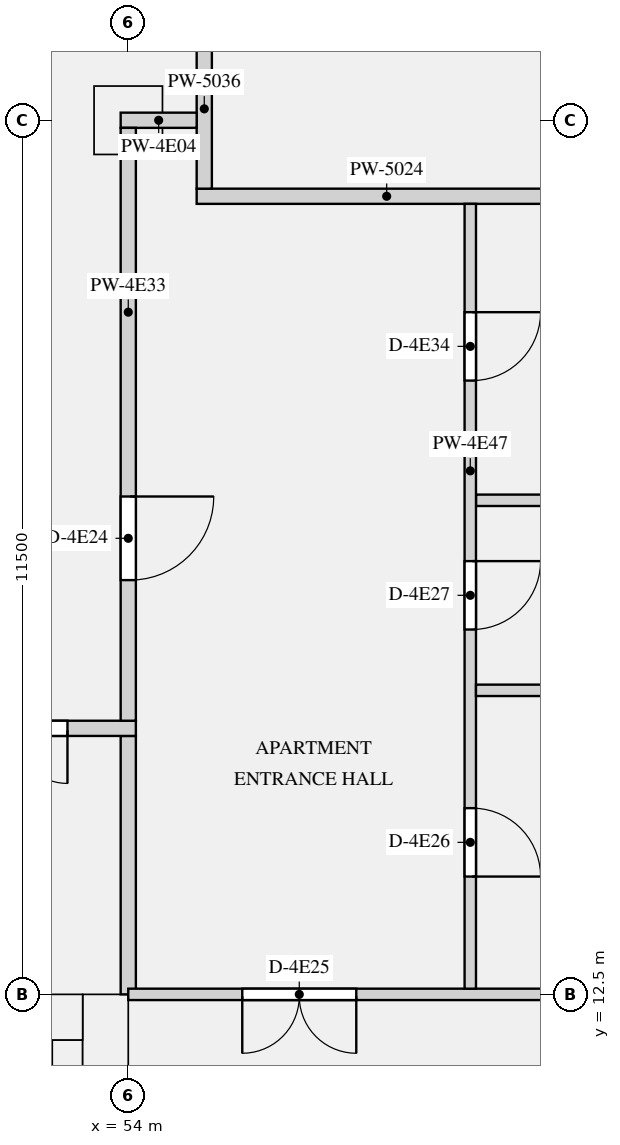
"""IFC4 building model, lengths in metres.
Left out: names, types, materials, properties, quantities, classifications, styles, units other than length and angle.
Written with IfcOpenShell. Run it as: python <this file> out.ifc"""

import sys

from ifc_helpers import new_model, si_unit, direction, frame, frame_2d, origin, origin_2d, place, context, subcontext, project, spatial, rectangle, extrude, element, fill, save


model = new_model("IFC4")
c1 = context("Model", 3, precision=1e-05, world=origin(), true_north=direction((0.0, 1.0)))
c2 = subcontext(c1, "Body", "Model", "MODEL_VIEW")
j1 = project(units=[si_unit("LENGTHUNIT", "METRE"), si_unit("PLANEANGLEUNIT", "RADIAN")], contexts=[c1])
p1 = place(None, origin())
s1 = spatial("IfcSite", under=j1, at=p1, CompositionType="ELEMENT")
p2 = place(p1, origin())
s2 = spatial("IfcBuilding", under=s1, at=p2, CompositionType="ELEMENT")
p3 = place(p2, frame((0.0, 0.0, 232.65)))
s3 = spatial("IfcBuildingStorey", under=s2, at=p3, CompositionType="ELEMENT", Elevation=232.65)
p4 = place(p3, frame((54.0, 24.0, 0.0), z_axis=(0.0, 0.0, 1.0), x_axis=(1.0, 0.0, 0.0)))
e1 = element("IfcColumn", 1, at=p4, inside=s3, PredefinedType="COLUMN", context=c2, shape_type="SweptSolid", body=[
    extrude(rectangle(XDim=0.9, YDim=0.9, at=origin_2d()), origin(), (0.0, 0.0, 1.0), 3.15),
])
p5 = place(p3, frame((53.7, 0.0, 0.0), z_axis=(0.0, 0.0, 1.0), x_axis=(0.0, 1.0, 0.0)))
e2 = element("IfcWall", 2, at=p5, inside=s3, PredefinedType="SHEAR", context=c2, shape_type="SweptSolid", body=[
    extrude(rectangle(XDim=12.5, YDim=0.6, at=frame_2d((6.25, 0.0))), origin(), (0.0, 0.0, 1.0), 3.15),
])
p6 = place(p3, frame((18.6, 12.2, 0.0), z_axis=(0.0, 0.0, 1.0), x_axis=(1.0, 0.0, 0.0)))
e3 = element("IfcWall", 3, at=p6, inside=s3, PredefinedType="SHEAR", context=c2, shape_type="SweptSolid", body=[
    extrude(rectangle(XDim=34.8, YDim=0.6, at=frame_2d((17.4, 0.0))), origin(), (0.0, 0.0, 1.0), 3.15),
])
p7 = place(p6, frame((24.575, 0.0, 0.0)))
e4 = element("IfcOpeningElement", 4, at=p7, cuts=e3, PredefinedType="OPENING", context=c2, shape_type="SweptSolid", body=[
    extrude(rectangle(XDim=1.1, YDim=2.1, at=frame_2d((0.55, 1.05))), frame((0.0, 0.31, 0.0), z_axis=(0.0, -1.0, 0.0), x_axis=(1.0, 0.0, 0.0)), (0.0, 0.0, 1.0), 0.62),
])
p8 = place(p6, frame((26.825, 0.0, 0.0)))
e5 = element("IfcOpeningElement", 5, at=p8, cuts=e3, PredefinedType="OPENING", context=c2, shape_type="SweptSolid", body=[
    extrude(rectangle(XDim=1.1, YDim=2.1, at=frame_2d((0.55, 1.05))), frame((0.0, 0.31, 0.0), z_axis=(0.0, -1.0, 0.0), x_axis=(1.0, 0.0, 0.0)), (0.0, 0.0, 1.0), 0.62),
])
p9 = place(p6, frame((29.075, 0.0, 0.0)))
e6 = element("IfcOpeningElement", 6, at=p9, cuts=e3, PredefinedType="OPENING", context=c2, shape_type="SweptSolid", body=[
    extrude(rectangle(XDim=1.1, YDim=2.1, at=frame_2d((0.55, 1.05))), frame((0.0, 0.31, 0.0), z_axis=(0.0, -1.0, 0.0), x_axis=(1.0, 0.0, 0.0)), (0.0, 0.0, 1.0), 0.62),
])
p10 = place(p6, frame((4.95, 0.0, 0.0)))
e7 = element("IfcOpeningElement", 7, at=p10, cuts=e3, PredefinedType="OPENING", context=c2, shape_type="SweptSolid", body=[
    extrude(rectangle(XDim=0.9, YDim=2.1, at=frame_2d((0.45, 1.05))), frame((0.0, 0.31, 0.0), z_axis=(0.0, -1.0, 0.0), x_axis=(1.0, 0.0, 0.0)), (0.0, 0.0, 1.0), 0.62),
])
p11 = place(p6, frame((11.95, 0.0, 0.0)))
e8 = element("IfcOpeningElement", 8, at=p11, cuts=e3, PredefinedType="OPENING", context=c2, shape_type="SweptSolid", body=[
    extrude(rectangle(XDim=0.9, YDim=2.1, at=frame_2d((0.45, 1.05))), frame((0.0, 0.31, 0.0), z_axis=(0.0, -1.0, 0.0), x_axis=(1.0, 0.0, 0.0)), (0.0, 0.0, 1.0), 0.62),
])
p12 = place(p6, frame((18.45, 0.0, 0.0)))
e9 = element("IfcOpeningElement", 9, at=p12, cuts=e3, PredefinedType="OPENING", context=c2, shape_type="SweptSolid", body=[
    extrude(rectangle(XDim=0.9, YDim=2.1, at=frame_2d((0.45, 1.05))), frame((0.0, 0.31, 0.0), z_axis=(0.0, -1.0, 0.0), x_axis=(1.0, 0.0, 0.0)), (0.0, 0.0, 1.0), 0.62),
])
p13 = place(p6, frame((1.55, 0.0, 0.0)))
e10 = element("IfcOpeningElement", 10, at=p13, cuts=e3, PredefinedType="OPENING", context=c2, shape_type="SweptSolid", body=[
    extrude(rectangle(XDim=1.2, YDim=2.1, at=frame_2d((0.6, 1.05))), frame((0.0, 0.31, 0.0), z_axis=(0.0, -1.0, 0.0), x_axis=(1.0, 0.0, 0.0)), (0.0, 0.0, 1.0), 0.62),
])
p14 = place(p6, frame((32.05, 0.0, 0.0)))
e11 = element("IfcOpeningElement", 11, at=p14, cuts=e3, PredefinedType="OPENING", context=c2, shape_type="SweptSolid", body=[
    extrude(rectangle(XDim=1.2, YDim=2.1, at=frame_2d((0.6, 1.05))), frame((0.0, 0.31, 0.0), z_axis=(0.0, -1.0, 0.0), x_axis=(1.0, 0.0, 0.0)), (0.0, 0.0, 1.0), 0.62),
])
p15 = place(p3, frame((53.2, 1.0, 0.0), z_axis=(0.0, 0.0, 1.0), x_axis=(0.0, 1.0, 0.0)))
e12 = element("IfcWall", 12, at=p15, inside=s3, PredefinedType="SHEAR", context=c2, shape_type="SweptSolid", body=[
    extrude(rectangle(XDim=10.9, YDim=0.4, at=frame_2d((5.45, 0.0))), origin(), (0.0, 0.0, 1.0), 3.15),
])
p16 = place(p3, frame((54.9, 23.0, 0.0), z_axis=(0.0, 0.0, 1.0), x_axis=(1.0, 0.0, 0.0)))
e13 = element("IfcWall", 13, at=p16, inside=s3, PredefinedType="PARTITIONING", context=c2, shape_type="SweptSolid", body=[
    extrude(rectangle(XDim=5.0, YDim=0.2, at=frame_2d((2.5, 0.0))), origin(), (0.0, 0.0, 1.0), 2.8),
])
p17 = place(p3, frame((54.0, 12.5, 0.0), z_axis=(0.0, 0.0, 1.0), x_axis=(0.0, 1.0, 0.0)))
e14 = element("IfcWall", 14, at=p17, inside=s3, PredefinedType="PARTITIONING", context=c2, shape_type="SweptSolid", body=[
    extrude(rectangle(XDim=3.4, YDim=0.2, at=frame_2d((1.7, 0.0))), origin(), (0.0, 0.0, 1.0), 2.8),
])
p18 = place(p3, frame((55.0, 23.1, 0.0), z_axis=(0.0, 0.0, 1.0), x_axis=(0.0, 1.0, 0.0)))
e15 = element("IfcWall", 15, at=p18, inside=s3, PredefinedType="PARTITIONING", context=c2, shape_type="SweptSolid", body=[
    extrude(rectangle(XDim=3.8, YDim=0.2, at=frame_2d((1.9, 0.0))), origin(), (0.0, 0.0, 1.0), 2.8),
])
p19 = place(p18, frame((2.1, 0.0, 0.0)))
e16 = element("IfcOpeningElement", 16, at=p19, cuts=e15, PredefinedType="OPENING", context=c2, shape_type="SweptSolid", body=[
    extrude(rectangle(XDim=1.2, YDim=2.1, at=frame_2d((0.6, 1.05))), frame((0.0, 0.11, 0.0), z_axis=(0.0, -1.0, 0.0), x_axis=(1.0, 0.0, 0.0)), (0.0, 0.0, 1.0), 0.22),
])
p20 = place(p3, frame((53.9, 24.0, 0.0), z_axis=(0.0, 0.0, 1.0), x_axis=(1.0, 0.0, 0.0)))
e17 = element("IfcWall", 17, at=p20, inside=s3, PredefinedType="PARTITIONING", context=c2, shape_type="SweptSolid", body=[
    extrude(rectangle(XDim=1.0, YDim=0.2, at=frame_2d((0.5, 0.0))), origin(), (0.0, 0.0, 1.0), 2.8),
])
p21 = place(p3, frame((58.575, 16.5, 0.0), z_axis=(0.0, 0.0, 1.0), x_axis=(1.0, 0.0, 0.0)))
e18 = element("IfcWall", 18, at=p21, inside=s3, PredefinedType="PARTITIONING", context=c2, shape_type="SweptSolid", body=[
    extrude(rectangle(XDim=4.35, YDim=0.15, at=frame_2d((2.175, 0.0))), origin(), (0.0, 0.0, 1.0), 2.8),
])
p22 = place(p3, frame((54.0, 12.5, 0.0), z_axis=(0.0, 0.0, 1.0), x_axis=(1.0, 0.0, 0.0)))
e19 = element("IfcWall", 19, at=p22, inside=s3, PredefinedType="PARTITIONING", context=c2, shape_type="SweptSolid", body=[
    extrude(rectangle(XDim=17.35, YDim=0.15, at=frame_2d((8.675, 0.0))), origin(), (0.0, 0.0, 1.0), 2.8),
])
p23 = place(p22, frame((1.5, 0.0, 0.0)))
e20 = element("IfcOpeningElement", 20, at=p23, cuts=e19, PredefinedType="OPENING", context=c2, shape_type="SweptSolid", body=[
    extrude(rectangle(XDim=1.5, YDim=2.1, at=frame_2d((0.75, 1.05))), frame((0.0, 0.085, 0.0), z_axis=(0.0, -1.0, 0.0), x_axis=(1.0, 0.0, 0.0)), (0.0, 0.0, 1.0), 0.17),
])
p24 = place(p22, frame((12.725, 0.0, 0.0)))
e21 = element("IfcOpeningElement", 21, at=p24, cuts=e19, PredefinedType="OPENING", context=c2, shape_type="SweptSolid", body=[
    extrude(rectangle(XDim=1.5, YDim=2.1, at=frame_2d((0.75, 1.05))), frame((0.0, 0.085, 0.0), z_axis=(0.0, -1.0, 0.0), x_axis=(1.0, 0.0, 0.0)), (0.0, 0.0, 1.0), 0.17),
])
p25 = place(p3, frame((58.575, 19.0, 0.0), z_axis=(0.0, 0.0, 1.0), x_axis=(1.0, 0.0, 0.0)))
e22 = element("IfcWall", 22, at=p25, inside=s3, PredefinedType="PARTITIONING", context=c2, shape_type="SweptSolid", body=[
    extrude(rectangle(XDim=4.35, YDim=0.15, at=frame_2d((2.175, 0.0))), origin(), (0.0, 0.0, 1.0), 2.8),
])
p26 = place(p3, frame((17.9, 16.0, 0.0), z_axis=(0.0, 0.0, 1.0), x_axis=(1.0, 0.0, 0.0)))
e23 = element("IfcWall", 23, at=p26, inside=s3, PredefinedType="PARTITIONING", context=c2, shape_type="SweptSolid", body=[
    extrude(rectangle(XDim=36.2, YDim=0.2, at=frame_2d((18.1, 0.0))), origin(), (0.0, 0.0, 1.0), 2.8),
])
p27 = place(p26, frame((0.9, 0.0, 0.0)))
e24 = element("IfcOpeningElement", 24, at=p27, cuts=e23, PredefinedType="OPENING", context=c2, shape_type="SweptSolid", body=[
    extrude(rectangle(XDim=1.4, YDim=2.1, at=frame_2d((0.7, 1.05))), frame((0.0, 0.11, 0.0), z_axis=(0.0, -1.0, 0.0), x_axis=(1.0, 0.0, 0.0)), (0.0, 0.0, 1.0), 0.22),
])
p28 = place(p26, frame((33.9, 0.0, 0.0)))
e25 = element("IfcOpeningElement", 25, at=p28, cuts=e23, PredefinedType="OPENING", context=c2, shape_type="SweptSolid", body=[
    extrude(rectangle(XDim=1.4, YDim=2.1, at=frame_2d((0.7, 1.05))), frame((0.0, 0.11, 0.0), z_axis=(0.0, -1.0, 0.0), x_axis=(1.0, 0.0, 0.0)), (0.0, 0.0, 1.0), 0.22),
])
p29 = place(p3, frame((54.0, 16.1, 0.0), z_axis=(0.0, 0.0, 1.0), x_axis=(0.0, 1.0, 0.0)))
e26 = element("IfcWall", 26, at=p29, inside=s3, PredefinedType="PARTITIONING", context=c2, shape_type="SweptSolid", body=[
    extrude(rectangle(XDim=7.8, YDim=0.2, at=frame_2d((3.9, 0.0))), origin(), (0.0, 0.0, 1.0), 2.8),
])
p30 = place(p29, frame((1.85, 0.0, 0.0)))
e27 = element("IfcOpeningElement", 27, at=p30, cuts=e26, PredefinedType="OPENING", context=c2, shape_type="SweptSolid", body=[
    extrude(rectangle(XDim=1.1, YDim=2.1, at=frame_2d((0.55, 1.05))), frame((0.0, 0.11, 0.0), z_axis=(0.0, -1.0, 0.0), x_axis=(1.0, 0.0, 0.0)), (0.0, 0.0, 1.0), 0.22),
])
p31 = place(p3, frame((58.5, 12.575, 0.0), z_axis=(0.0, 0.0, 1.0), x_axis=(0.0, 1.0, 0.0)))
e28 = element("IfcWall", 28, at=p31, inside=s3, PredefinedType="PARTITIONING", context=c2, shape_type="SweptSolid", body=[
    extrude(rectangle(XDim=10.325, YDim=0.15, at=frame_2d((5.163, 0.0))), origin(), (0.0, 0.0, 1.0), 2.8),
])
p32 = place(p31, frame((1.475, 0.0, 0.0)))
e29 = element("IfcOpeningElement", 29, at=p32, cuts=e28, PredefinedType="OPENING", context=c2, shape_type="SweptSolid", body=[
    extrude(rectangle(XDim=0.9, YDim=2.1, at=frame_2d((0.45, 1.05))), frame((0.0, 0.085, 0.0), z_axis=(0.0, -1.0, 0.0), x_axis=(1.0, 0.0, 0.0)), (0.0, 0.0, 1.0), 0.17),
])
p33 = place(p31, frame((4.725, 0.0, 0.0)))
e30 = element("IfcOpeningElement", 30, at=p33, cuts=e28, PredefinedType="OPENING", context=c2, shape_type="SweptSolid", body=[
    extrude(rectangle(XDim=0.9, YDim=2.1, at=frame_2d((0.45, 1.05))), frame((0.0, 0.085, 0.0), z_axis=(0.0, -1.0, 0.0), x_axis=(1.0, 0.0, 0.0)), (0.0, 0.0, 1.0), 0.17),
])
p34 = place(p31, frame((8.0, 0.0, 0.0)))
e31 = element("IfcOpeningElement", 31, at=p34, cuts=e28, PredefinedType="OPENING", context=c2, shape_type="SweptSolid", body=[
    extrude(rectangle(XDim=0.9, YDim=2.1, at=frame_2d((0.45, 1.05))), frame((0.0, 0.085, 0.0), z_axis=(0.0, -1.0, 0.0), x_axis=(1.0, 0.0, 0.0)), (0.0, 0.0, 1.0), 0.17),
])
p35 = place(p28, frame((1.4, 0.0, 0.0), z_axis=(0.0, 0.0, 1.0), x_axis=(-1.0, 0.0, 0.0)))
e32 = element("IfcDoor", 32, at=p35, inside=s3, OperationType="DOUBLE_DOOR_SINGLE_SWING", PredefinedType="DOOR", context=c2, shape_type="SweptSolid", body=[
    extrude(rectangle(XDim=1.4, YDim=2.1, at=frame_2d((0.7, 1.05))), frame((0.0, 0.025, 0.0), z_axis=(0.0, -1.0, 0.0), x_axis=(1.0, 0.0, 0.0)), (0.0, 0.0, 1.0), 0.05),
])
fill(e25, e32)
p36 = place(p30, frame((1.1, 0.0, 0.0), z_axis=(0.0, 0.0, 1.0), x_axis=(-1.0, 0.0, 0.0)))
e33 = element("IfcDoor", 33, at=p36, inside=s3, OperationType="SINGLE_SWING_LEFT", PredefinedType="DOOR", context=c2, shape_type="SweptSolid", body=[
    extrude(rectangle(XDim=1.1, YDim=2.1, at=frame_2d((0.55, 1.05))), frame((0.0, 0.025, 0.0), z_axis=(0.0, -1.0, 0.0), x_axis=(1.0, 0.0, 0.0)), (0.0, 0.0, 1.0), 0.05),
])
fill(e27, e33)
p37 = place(p23, frame((1.5, 0.0, 0.0), z_axis=(0.0, 0.0, 1.0), x_axis=(-1.0, 0.0, 0.0)))
e34 = element("IfcDoor", 34, at=p37, inside=s3, OperationType="DOUBLE_DOOR_SINGLE_SWING", PredefinedType="DOOR", context=c2, shape_type="SweptSolid", body=[
    extrude(rectangle(XDim=1.5, YDim=2.1, at=frame_2d((0.75, 1.05))), frame((0.0, 0.025, 0.0), z_axis=(0.0, -1.0, 0.0), x_axis=(1.0, 0.0, 0.0)), (0.0, 0.0, 1.0), 0.05),
])
fill(e20, e34)
p38 = place(p32, frame((0.9, 0.0, 0.0), z_axis=(0.0, 0.0, 1.0), x_axis=(-1.0, 0.0, 0.0)))
e35 = element("IfcDoor", 35, at=p38, inside=s3, OperationType="SINGLE_SWING_RIGHT", PredefinedType="DOOR", context=c2, shape_type="SweptSolid", body=[
    extrude(rectangle(XDim=0.9, YDim=2.1, at=frame_2d((0.45, 1.05))), frame((0.0, 0.025, 0.0), z_axis=(0.0, -1.0, 0.0), x_axis=(1.0, 0.0, 0.0)), (0.0, 0.0, 1.0), 0.05),
])
fill(e29, e35)
p39 = place(p33, frame((0.9, 0.0, 0.0), z_axis=(0.0, 0.0, 1.0), x_axis=(-1.0, 0.0, 0.0)))
e36 = element("IfcDoor", 36, at=p39, inside=s3, OperationType="SINGLE_SWING_LEFT", PredefinedType="DOOR", context=c2, shape_type="SweptSolid", body=[
    extrude(rectangle(XDim=0.9, YDim=2.1, at=frame_2d((0.45, 1.05))), frame((0.0, 0.025, 0.0), z_axis=(0.0, -1.0, 0.0), x_axis=(1.0, 0.0, 0.0)), (0.0, 0.0, 1.0), 0.05),
])
fill(e30, e36)
p40 = place(p34, frame((0.9, 0.0, 0.0), z_axis=(0.0, 0.0, 1.0), x_axis=(-1.0, 0.0, 0.0)))
e37 = element("IfcDoor", 37, at=p40, inside=s3, OperationType="SINGLE_SWING_LEFT", PredefinedType="DOOR", context=c2, shape_type="SweptSolid", body=[
    extrude(rectangle(XDim=0.9, YDim=2.1, at=frame_2d((0.45, 1.05))), frame((0.0, 0.025, 0.0), z_axis=(0.0, -1.0, 0.0), x_axis=(1.0, 0.0, 0.0)), (0.0, 0.0, 1.0), 0.05),
])
fill(e31, e37)
save(model, sys.argv[1])
